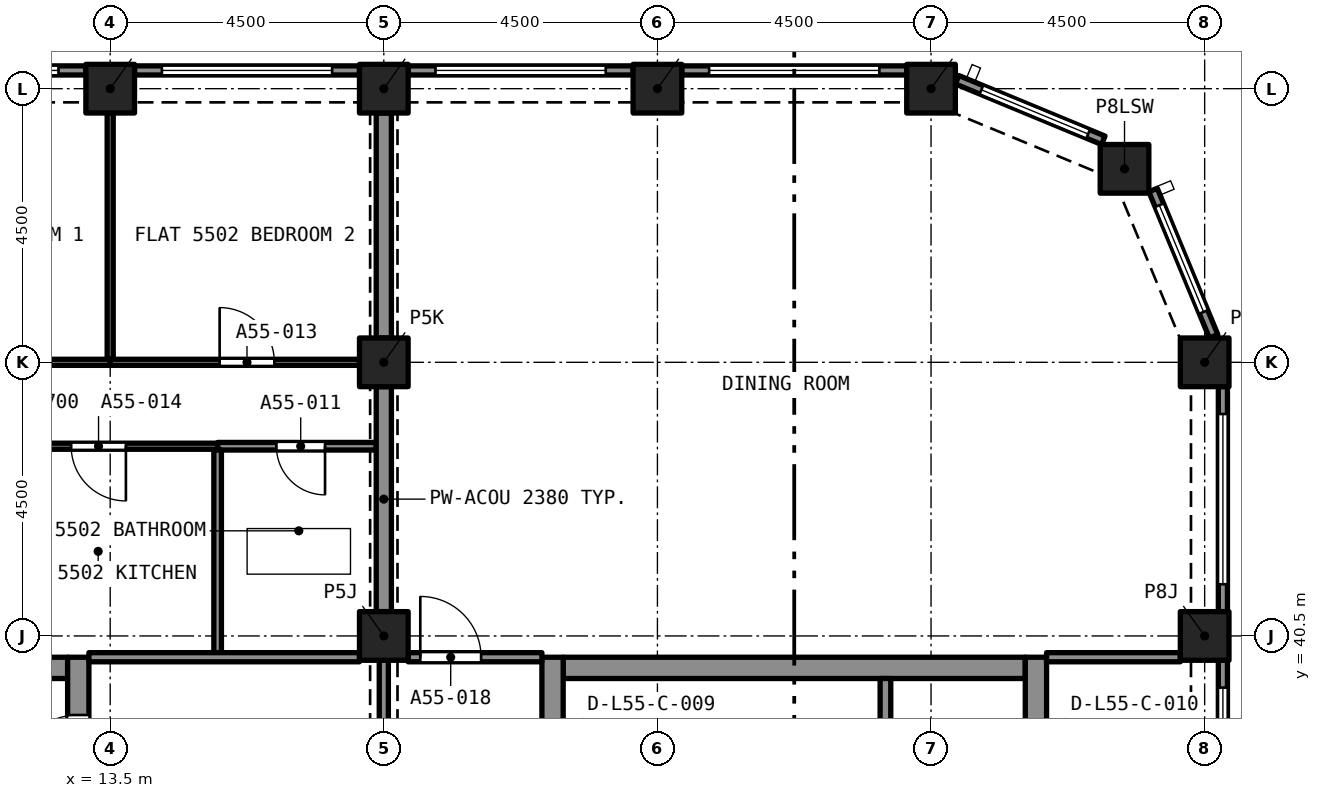
"""IFC4 building model, lengths in metres.
Left out: names, types, materials, properties, quantities, classifications, styles, units other than length and angle.
Written with IfcOpenShell. Run it as: python <this file> out.ifc"""

import sys

from ifc_helpers import new_model, si_unit, direction, frame, frame_2d, origin, origin_2d, place, context, subcontext, project, spatial, rectangle, extrude, element, fill, save


model = new_model("IFC4")
c1 = context("Model", 3, precision=1e-05, world=origin(), true_north=direction((0.0, 1.0)))
c2 = subcontext(c1, "Body", "Model", "MODEL_VIEW")
j1 = project(units=[si_unit("LENGTHUNIT", "METRE"), si_unit("PLANEANGLEUNIT", "RADIAN")], contexts=[c1])
p1 = place(None, origin())
s1 = spatial("IfcSite", under=j1, at=p1, CompositionType="ELEMENT")
p2 = place(p1, origin())
s2 = spatial("IfcBuilding", under=s1, at=p2, CompositionType="ELEMENT")
p3 = place(p2, frame((0.0, 0.0, 198.7)))
s3 = spatial("IfcBuildingStorey", under=s2, at=p3, CompositionType="ELEMENT", Elevation=198.7)
for number, where, z_axis, x_axis in (
    (1, (18.0, 40.5, 0.0), (0.0, 0.0, 1.0), (1.0, 0.0, 0.0)),
    (2, (31.5, 40.5, 0.0), (0.0, 0.0, 1.0), (1.0, 0.0, 0.0)),
    (3, (18.0, 45.0, 0.0), (0.0, 0.0, 1.0), (1.0, 0.0, 0.0)),
    (4, (31.5, 45.0, 0.0), (0.0, 0.0, 1.0), (1.0, 0.0, 0.0)),
    (5, (30.182, 48.182, 0.0), (0.0, 0.0, 1.0), (1.0, 0.0, 0.0)),
    (6, (13.5, 49.5, 0.0), (0.0, 0.0, 1.0), (1.0, 0.0, 0.0)),
    (7, (18.0, 49.5, 0.0), (0.0, 0.0, 1.0), (1.0, 0.0, 0.0)),
    (8, (22.5, 49.5, 0.0), (0.0, 0.0, 1.0), (1.0, 0.0, 0.0)),
    (9, (27.0, 49.5, 0.0), (0.0, 0.0, 1.0), (1.0, 0.0, 0.0)),
):
    element("IfcColumn", number, at=place(p3, frame(where, z_axis=z_axis, x_axis=x_axis)), inside=s3, PredefinedType="COLUMN", context=c2, shape_type="SweptSolid", body=[
        extrude(rectangle(XDim=0.8, YDim=0.8, at=origin_2d()), origin(), (0.0, 0.0, 1.0), 3.2),
    ])
p4 = place(p3, frame((5.2, 39.975, 0.0), z_axis=(0.0, 0.0, 1.0), x_axis=(1.0, 0.0, 0.0)))
e10 = element("IfcWall", 10, at=p4, inside=s3, PredefinedType="SOLIDWALL", context=c2, shape_type="SweptSolid", body=[
    extrude(rectangle(XDim=7.6, YDim=0.35, at=frame_2d((3.8, 0.0))), origin(), (0.0, 0.0, 1.0), 3.2),
])
p5 = place(p3, frame((12.975, 27.35, 0.0), z_axis=(0.0, 0.0, 1.0), x_axis=(0.0, 1.0, 0.0)))
e11 = element("IfcWall", 11, at=p5, inside=s3, PredefinedType="SOLIDWALL", context=c2, shape_type="SweptSolid", body=[
    extrude(rectangle(XDim=12.8, YDim=0.35, at=frame_2d((6.4, 0.0))), origin(), (0.0, 0.0, 1.0), 3.2),
])
p6 = place(p5, frame((10.75, 0.0, 0.0)))
e12 = element("IfcOpeningElement", 12, at=p6, cuts=e11, PredefinedType="OPENING", context=c2, shape_type="SweptSolid", body=[
    extrude(rectangle(XDim=1.1, YDim=2.1, at=frame_2d((0.55, 1.05))), frame((0.0, 0.185, 0.0), z_axis=(0.0, -1.0, 0.0), x_axis=(1.0, 0.0, 0.0)), (0.0, 0.0, 1.0), 0.37),
])
p7 = place(p5, frame((8.6, 0.0, 0.0)))
e13 = element("IfcOpeningElement", 13, at=p7, cuts=e11, PredefinedType="OPENING", context=c2, shape_type="SweptSolid", body=[
    extrude(rectangle(XDim=1.2, YDim=2.1, at=frame_2d((0.6, 1.05))), frame((0.0, 0.185, 0.0), z_axis=(0.0, -1.0, 0.0), x_axis=(1.0, 0.0, 0.0)), (0.0, 0.0, 1.0), 0.37),
])
p8 = place(p3, frame((20.95, 39.975, 0.0), z_axis=(0.0, 0.0, 1.0), x_axis=(1.0, 0.0, 0.0)))
e14 = element("IfcWall", 14, at=p8, inside=s3, PredefinedType="SOLIDWALL", context=c2, shape_type="SweptSolid", body=[
    extrude(rectangle(XDim=7.6, YDim=0.35, at=frame_2d((3.8, 0.0))), origin(), (0.0, 0.0, 1.0), 3.2),
])
p9 = place(p3, frame((20.775, 27.35, 0.0), z_axis=(0.0, 0.0, 1.0), x_axis=(0.0, 1.0, 0.0)))
e15 = element("IfcWall", 15, at=p9, inside=s3, PredefinedType="SOLIDWALL", context=c2, shape_type="SweptSolid", body=[
    extrude(rectangle(XDim=12.8, YDim=0.35, at=frame_2d((6.4, 0.0))), origin(), (0.0, 0.0, 1.0), 3.2),
])
p10 = place(p9, frame((8.6, 0.0, 0.0)))
e16 = element("IfcOpeningElement", 16, at=p10, cuts=e15, PredefinedType="OPENING", context=c2, shape_type="SweptSolid", body=[
    extrude(rectangle(XDim=1.2, YDim=2.1, at=frame_2d((0.6, 1.05))), frame((0.0, 0.185, 0.0), z_axis=(0.0, -1.0, 0.0), x_axis=(1.0, 0.0, 0.0)), (0.0, 0.0, 1.0), 0.37),
])
p11 = place(p3, frame((28.725, 27.35, 0.0), z_axis=(0.0, 0.0, 1.0), x_axis=(0.0, 1.0, 0.0)))
e17 = element("IfcWall", 17, at=p11, inside=s3, PredefinedType="SOLIDWALL", context=c2, shape_type="SweptSolid", body=[
    extrude(rectangle(XDim=12.8, YDim=0.35, at=frame_2d((6.4, 0.0))), origin(), (0.0, 0.0, 1.0), 3.2),
])
p12 = place(p11, frame((8.6, 0.0, 0.0)))
e18 = element("IfcOpeningElement", 18, at=p12, cuts=e17, PredefinedType="OPENING", context=c2, shape_type="SweptSolid", body=[
    extrude(rectangle(XDim=1.2, YDim=2.1, at=frame_2d((0.6, 1.05))), frame((0.0, 0.185, 0.0), z_axis=(0.0, -1.0, 0.0), x_axis=(1.0, 0.0, 0.0)), (0.0, 0.0, 1.0), 0.37),
])
p13 = place(p3, frame((31.8, 40.1, 0.0), z_axis=(0.0, 0.0, 1.0), x_axis=(0.0, -1.0, 0.0)))
e19 = element("IfcWall", 19, at=p13, inside=s3, PredefinedType="SOLIDWALL", context=c2, shape_type="SweptSolid", body=[
    extrude(rectangle(XDim=3.7, YDim=0.15, at=frame_2d((1.85, 0.0))), origin(), (0.0, 0.0, 1.0), 3.2),
])
p14 = place(p13, frame((0.45, 0.0, 0.45)))
e20 = element("IfcOpeningElement", 20, at=p14, cuts=e19, PredefinedType="OPENING", context=c2, shape_type="SweptSolid", body=[
    extrude(rectangle(XDim=2.8, YDim=1.95, at=frame_2d((1.4, 0.975))), frame((0.0, 0.085, 0.0), z_axis=(0.0, -1.0, 0.0), x_axis=(1.0, 0.0, 0.0)), (0.0, 0.0, 1.0), 0.17),
])
p15 = place(p3, frame((31.8, 44.6, 0.0), z_axis=(0.0, 0.0, 1.0), x_axis=(0.0, -1.0, 0.0)))
e21 = element("IfcWall", 21, at=p15, inside=s3, PredefinedType="SOLIDWALL", context=c2, shape_type="SweptSolid", body=[
    extrude(rectangle(XDim=3.7, YDim=0.15, at=frame_2d((1.85, 0.0))), origin(), (0.0, 0.0, 1.0), 3.2),
])
p16 = place(p15, frame((0.45, 0.0, 0.45)))
e22 = element("IfcOpeningElement", 22, at=p16, cuts=e21, PredefinedType="OPENING", context=c2, shape_type="SweptSolid", body=[
    extrude(rectangle(XDim=2.8, YDim=1.95, at=frame_2d((1.4, 0.975))), frame((0.0, 0.085, 0.0), z_axis=(0.0, -1.0, 0.0), x_axis=(1.0, 0.0, 0.0)), (0.0, 0.0, 1.0), 0.17),
])
p17 = place(p3, frame((30.651, 47.833, 0.0), z_axis=(0.0, 0.0, 1.0), x_axis=(0.382669406082, -0.923885342263, 0.0)))
e23 = element("IfcWall", 23, at=p17, inside=s3, PredefinedType="SOLIDWALL", context=c2, shape_type="SweptSolid", body=[
    extrude(rectangle(XDim=2.602, YDim=0.15, at=frame_2d((1.301, 0.0))), origin(), (0.0, 0.0, 1.0), 3.2),
])
p18 = place(p17, frame((0.27, 0.0, 0.45)))
e24 = element("IfcOpeningElement", 24, at=p18, cuts=e23, PredefinedType="OPENING", context=c2, shape_type="SweptSolid", body=[
    extrude(rectangle(XDim=1.9, YDim=1.95, at=frame_2d((0.95, 0.975))), frame((0.0, 0.085, 0.0), z_axis=(0.0, -1.0, 0.0), x_axis=(1.0, 0.0, 0.0)), (0.0, 0.0, 1.0), 0.17),
])
p19 = place(p3, frame((27.429, 49.647, 0.0), z_axis=(0.0, 0.0, 1.0), x_axis=(0.923885342263, -0.382669406082, 0.0)))
e25 = element("IfcWall", 25, at=p19, inside=s3, PredefinedType="SOLIDWALL", context=c2, shape_type="SweptSolid", body=[
    extrude(rectangle(XDim=2.602, YDim=0.15, at=frame_2d((1.301, 0.0))), origin(), (0.0, 0.0, 1.0), 3.2),
])
p20 = place(p19, frame((0.432, 0.0, 0.45)))
e26 = element("IfcOpeningElement", 26, at=p20, cuts=e25, PredefinedType="OPENING", context=c2, shape_type="SweptSolid", body=[
    extrude(rectangle(XDim=1.9, YDim=1.95, at=frame_2d((0.95, 0.975))), frame((0.0, 0.085, 0.0), z_axis=(0.0, -1.0, 0.0), x_axis=(1.0, 0.0, 0.0)), (0.0, 0.0, 1.0), 0.17),
])
p21 = place(p3, frame((22.9, 49.8, 0.0), z_axis=(0.0, 0.0, 1.0), x_axis=(1.0, 0.0, 0.0)))
e27 = element("IfcWall", 27, at=p21, inside=s3, PredefinedType="SOLIDWALL", context=c2, shape_type="SweptSolid", body=[
    extrude(rectangle(XDim=3.7, YDim=0.15, at=frame_2d((1.85, 0.0))), origin(), (0.0, 0.0, 1.0), 3.2),
])
p22 = place(p21, frame((0.45, 0.0, 0.45)))
e28 = element("IfcOpeningElement", 28, at=p22, cuts=e27, PredefinedType="OPENING", context=c2, shape_type="SweptSolid", body=[
    extrude(rectangle(XDim=2.8, YDim=1.95, at=frame_2d((1.4, 0.975))), frame((0.0, 0.085, 0.0), z_axis=(0.0, -1.0, 0.0), x_axis=(1.0, 0.0, 0.0)), (0.0, 0.0, 1.0), 0.17),
])
p23 = place(p3, frame((18.4, 49.8, 0.0), z_axis=(0.0, 0.0, 1.0), x_axis=(1.0, 0.0, 0.0)))
e29 = element("IfcWall", 29, at=p23, inside=s3, PredefinedType="SOLIDWALL", context=c2, shape_type="SweptSolid", body=[
    extrude(rectangle(XDim=3.7, YDim=0.15, at=frame_2d((1.85, 0.0))), origin(), (0.0, 0.0, 1.0), 3.2),
])
p24 = place(p23, frame((0.45, 0.0, 0.45)))
e30 = element("IfcOpeningElement", 30, at=p24, cuts=e29, PredefinedType="OPENING", context=c2, shape_type="SweptSolid", body=[
    extrude(rectangle(XDim=2.8, YDim=1.95, at=frame_2d((1.4, 0.975))), frame((0.0, 0.085, 0.0), z_axis=(0.0, -1.0, 0.0), x_axis=(1.0, 0.0, 0.0)), (0.0, 0.0, 1.0), 0.17),
])
p25 = place(p3, frame((13.9, 49.8, 0.0), z_axis=(0.0, 0.0, 1.0), x_axis=(1.0, 0.0, 0.0)))
e31 = element("IfcWall", 31, at=p25, inside=s3, PredefinedType="SOLIDWALL", context=c2, shape_type="SweptSolid", body=[
    extrude(rectangle(XDim=3.7, YDim=0.15, at=frame_2d((1.85, 0.0))), origin(), (0.0, 0.0, 1.0), 3.2),
])
p26 = place(p25, frame((0.45, 0.0, 0.45)))
e32 = element("IfcOpeningElement", 32, at=p26, cuts=e31, PredefinedType="OPENING", context=c2, shape_type="SweptSolid", body=[
    extrude(rectangle(XDim=2.8, YDim=1.95, at=frame_2d((1.4, 0.975))), frame((0.0, 0.085, 0.0), z_axis=(0.0, -1.0, 0.0), x_axis=(1.0, 0.0, 0.0)), (0.0, 0.0, 1.0), 0.17),
])
p27 = place(p3, frame((9.4, 49.8, 0.0), z_axis=(0.0, 0.0, 1.0), x_axis=(1.0, 0.0, 0.0)))
e33 = element("IfcWall", 33, at=p27, inside=s3, PredefinedType="SOLIDWALL", context=c2, shape_type="SweptSolid", body=[
    extrude(rectangle(XDim=3.7, YDim=0.15, at=frame_2d((1.85, 0.0))), origin(), (0.0, 0.0, 1.0), 3.2),
])
p28 = place(p27, frame((0.45, 0.0, 0.45)))
e34 = element("IfcOpeningElement", 34, at=p28, cuts=e33, PredefinedType="OPENING", context=c2, shape_type="SweptSolid", body=[
    extrude(rectangle(XDim=2.8, YDim=1.95, at=frame_2d((1.4, 0.975))), frame((0.0, 0.085, 0.0), z_axis=(0.0, -1.0, 0.0), x_axis=(1.0, 0.0, 0.0)), (0.0, 0.0, 1.0), 0.17),
])
p29 = place(p3, frame((17.875, 43.62, 0.0), z_axis=(0.0, 0.0, 1.0), x_axis=(-1.0, 0.0, 0.0)))
e35 = element("IfcWall", 35, at=p29, inside=s3, PredefinedType="PARTITIONING", context=c2, shape_type="SweptSolid", body=[
    extrude(rectangle(XDim=2.608, YDim=0.125, at=frame_2d((1.304, 0.0))), origin(), (0.0, 0.0, 1.0), 2.7),
])
p30 = place(p29, frame((0.842, 0.0, 0.0)))
e36 = element("IfcOpeningElement", 36, at=p30, cuts=e35, PredefinedType="OPENING", context=c2, shape_type="SweptSolid", body=[
    extrude(rectangle(XDim=0.8, YDim=2.1, at=frame_2d((0.4, 1.05))), frame((0.0, 0.073, 0.0), z_axis=(0.0, -1.0, 0.0), x_axis=(1.0, 0.0, 0.0)), (0.0, 0.0, 1.0), 0.145),
])
p31 = place(p3, frame((15.267, 40.225, 0.0), z_axis=(0.0, 0.0, 1.0), x_axis=(0.0, 1.0, 0.0)))
e37 = element("IfcWall", 37, at=p31, inside=s3, PredefinedType="PARTITIONING", context=c2, shape_type="SweptSolid", body=[
    extrude(rectangle(XDim=3.333, YDim=0.125, at=frame_2d((1.666, 0.0))), origin(), (0.0, 0.0, 1.0), 2.7),
])
p32 = place(p3, frame((18.0, 40.9, 0.0), z_axis=(0.0, 0.0, 1.0), x_axis=(0.0, 1.0, 0.0)))
e38 = element("IfcWall", 38, at=p32, inside=s3, PredefinedType="PARTITIONING", context=c2, shape_type="SweptSolid", body=[
    extrude(rectangle(XDim=3.7, YDim=0.25, at=frame_2d((1.85, 0.0))), origin(), (0.0, 0.0, 1.0), 2.38),
])
p33 = place(p3, frame((13.5, 45.05, 0.0), z_axis=(0.0, 0.0, 1.0), x_axis=(0.0, 1.0, 0.0)))
e39 = element("IfcWall", 39, at=p33, inside=s3, PredefinedType="PARTITIONING", context=c2, shape_type="SweptSolid", body=[
    extrude(rectangle(XDim=4.05, YDim=0.1, at=frame_2d((2.025, 0.0))), origin(), (0.0, 0.0, 1.0), 2.7),
])
p34 = place(p3, frame((9.0, 45.0, 0.0), z_axis=(0.0, 0.0, 1.0), x_axis=(1.0, 0.0, 0.0)))
e40 = element("IfcWall", 40, at=p34, inside=s3, PredefinedType="PARTITIONING", context=c2, shape_type="SweptSolid", body=[
    extrude(rectangle(XDim=4.5, YDim=0.1, at=frame_2d((2.25, 0.0))), origin(), (0.0, 0.0, 1.0), 2.7),
])
p35 = place(p34, frame((1.8, 0.0, 0.0)))
e41 = element("IfcOpeningElement", 41, at=p35, cuts=e40, PredefinedType="OPENING", context=c2, shape_type="SweptSolid", body=[
    extrude(rectangle(XDim=0.9, YDim=2.1, at=frame_2d((0.45, 1.05))), frame((0.0, 0.06, 0.0), z_axis=(0.0, -1.0, 0.0), x_axis=(1.0, 0.0, 0.0)), (0.0, 0.0, 1.0), 0.12),
])
p36 = place(p3, frame((13.5, 45.0, 0.0), z_axis=(0.0, 0.0, 1.0), x_axis=(1.0, 0.0, 0.0)))
e42 = element("IfcWall", 42, at=p36, inside=s3, PredefinedType="PARTITIONING", context=c2, shape_type="SweptSolid", body=[
    extrude(rectangle(XDim=4.1, YDim=0.1, at=frame_2d((2.05, 0.0))), origin(), (0.0, 0.0, 1.0), 2.7),
])
p37 = place(p36, frame((1.8, 0.0, 0.0)))
e43 = element("IfcOpeningElement", 43, at=p37, cuts=e42, PredefinedType="OPENING", context=c2, shape_type="SweptSolid", body=[
    extrude(rectangle(XDim=0.9, YDim=2.1, at=frame_2d((0.45, 1.05))), frame((0.0, 0.06, 0.0), z_axis=(0.0, -1.0, 0.0), x_axis=(1.0, 0.0, 0.0)), (0.0, 0.0, 1.0), 0.12),
])
p38 = place(p3, frame((18.0, 45.4, 0.0), z_axis=(0.0, 0.0, 1.0), x_axis=(0.0, 1.0, 0.0)))
e44 = element("IfcWall", 44, at=p38, inside=s3, PredefinedType="PARTITIONING", context=c2, shape_type="SweptSolid", body=[
    extrude(rectangle(XDim=3.7, YDim=0.25, at=frame_2d((1.85, 0.0))), origin(), (0.0, 0.0, 1.0), 2.38),
])
p39 = place(p3, frame((15.267, 43.62, 0.0), z_axis=(0.0, 0.0, 1.0), x_axis=(-1.0, 0.0, 0.0)))
e45 = element("IfcWall", 45, at=p39, inside=s3, PredefinedType="PARTITIONING", context=c2, shape_type="SweptSolid", body=[
    extrude(rectangle(XDim=3.967, YDim=0.1, at=frame_2d((1.983, 0.0))), origin(), (0.0, 0.0, 1.0), 2.7),
])
p40 = place(p39, frame((1.508, 0.0, 0.0)))
e46 = element("IfcOpeningElement", 46, at=p40, cuts=e45, PredefinedType="OPENING", context=c2, shape_type="SweptSolid", body=[
    extrude(rectangle(XDim=0.9, YDim=2.1, at=frame_2d((0.45, 1.05))), frame((0.0, 0.06, 0.0), z_axis=(0.0, -1.0, 0.0), x_axis=(1.0, 0.0, 0.0)), (0.0, 0.0, 1.0), 0.12),
])
p41 = place(p3, frame((13.15, 40.15, 0.0), z_axis=(0.0, 0.0, 1.0), x_axis=(1.0, 0.0, 0.0)))
e47 = element("IfcWall", 47, at=p41, inside=s3, PredefinedType="PARTITIONING", context=c2, shape_type="SweptSolid", body=[
    extrude(rectangle(XDim=4.45, YDim=0.15, at=frame_2d((2.225, 0.0))), origin(), (0.0, 0.0, 1.0), 2.7),
])
p42 = place(p3, frame((18.4, 40.15, 0.0), z_axis=(0.0, 0.0, 1.0), x_axis=(1.0, 0.0, 0.0)))
e48 = element("IfcWall", 48, at=p42, inside=s3, PredefinedType="PARTITIONING", context=c2, shape_type="SweptSolid", body=[
    extrude(rectangle(XDim=2.2, YDim=0.15, at=frame_2d((1.1, 0.0))), origin(), (0.0, 0.0, 1.0), 2.7),
])
p43 = place(p42, frame((0.2, 0.0, 0.0)))
e49 = element("IfcOpeningElement", 49, at=p43, cuts=e48, PredefinedType="OPENING", context=c2, shape_type="SweptSolid", body=[
    extrude(rectangle(XDim=1.0, YDim=2.1, at=frame_2d((0.5, 1.05))), frame((0.0, 0.085, 0.0), z_axis=(0.0, -1.0, 0.0), x_axis=(1.0, 0.0, 0.0)), (0.0, 0.0, 1.0), 0.17),
])
p44 = place(p3, frame((28.9, 40.15, 0.0), z_axis=(0.0, 0.0, 1.0), x_axis=(1.0, 0.0, 0.0)))
e50 = element("IfcWall", 50, at=p44, inside=s3, PredefinedType="PARTITIONING", context=c2, shape_type="SweptSolid", body=[
    extrude(rectangle(XDim=2.2, YDim=0.15, at=frame_2d((1.1, 0.0))), origin(), (0.0, 0.0, 1.0), 2.7),
])
p45 = place(p3, frame((18.0, 40.1, 0.0), z_axis=(0.0, 0.0, 1.0), x_axis=(0.0, -1.0, 0.0)))
e51 = element("IfcWall", 51, at=p45, inside=s3, PredefinedType="PARTITIONING", context=c2, shape_type="SweptSolid", body=[
    extrude(rectangle(XDim=3.7, YDim=0.15, at=frame_2d((1.85, 0.0))), origin(), (0.0, 0.0, 1.0), 2.38),
])
p46 = place(p45, frame((1.25, 0.0, 0.0)))
e52 = element("IfcOpeningElement", 52, at=p46, cuts=e51, PredefinedType="OPENING", context=c2, shape_type="SweptSolid", body=[
    extrude(rectangle(XDim=1.2, YDim=2.1, at=frame_2d((0.6, 1.05))), frame((0.0, 0.085, 0.0), z_axis=(0.0, -1.0, 0.0), x_axis=(1.0, 0.0, 0.0)), (0.0, 0.0, 1.0), 0.17),
])
p47 = place(p3, frame((26.25, 37.5, 0.0), z_axis=(0.0, 0.0, 1.0), x_axis=(0.0, 1.0, 0.0)))
e53 = element("IfcWall", 53, at=p47, inside=s3, PredefinedType="SOLIDWALL", context=c2, shape_type="SweptSolid", body=[
    extrude(rectangle(XDim=2.3, YDim=0.175, at=frame_2d((1.15, 0.0))), origin(), (0.0, 0.0, 1.0), 2.7),
])
p48 = place(p14, origin())
e54 = element("IfcWindow", 54, at=p48, inside=s3, PartitioningType="SINGLE_PANEL", PredefinedType="WINDOW", context=c2, shape_type="SweptSolid", body=[
    extrude(rectangle(XDim=2.8, YDim=1.95, at=frame_2d((1.4, 0.975))), frame((0.0, 0.03, 0.0), z_axis=(0.0, -1.0, 0.0), x_axis=(1.0, 0.0, 0.0)), (0.0, 0.0, 1.0), 0.06),
])
fill(e20, e54)
p49 = place(p16, origin())
e55 = element("IfcWindow", 55, at=p49, inside=s3, PartitioningType="SINGLE_PANEL", PredefinedType="WINDOW", context=c2, shape_type="SweptSolid", body=[
    extrude(rectangle(XDim=2.8, YDim=1.95, at=frame_2d((1.4, 0.975))), frame((0.0, 0.03, 0.0), z_axis=(0.0, -1.0, 0.0), x_axis=(1.0, 0.0, 0.0)), (0.0, 0.0, 1.0), 0.06),
])
fill(e22, e55)
p50 = place(p18, origin())
e56 = element("IfcWindow", 56, at=p50, inside=s3, PartitioningType="SINGLE_PANEL", PredefinedType="WINDOW", context=c2, shape_type="SweptSolid", body=[
    extrude(rectangle(XDim=1.9, YDim=1.95, at=frame_2d((0.95, 0.975))), frame((0.0, 0.03, 0.0), z_axis=(0.0, -1.0, 0.0), x_axis=(1.0, 0.0, 0.0)), (0.0, 0.0, 1.0), 0.06),
])
fill(e24, e56)
p51 = place(p20, origin())
e57 = element("IfcWindow", 57, at=p51, inside=s3, PartitioningType="SINGLE_PANEL", PredefinedType="WINDOW", context=c2, shape_type="SweptSolid", body=[
    extrude(rectangle(XDim=1.9, YDim=1.95, at=frame_2d((0.95, 0.975))), frame((0.0, 0.03, 0.0), z_axis=(0.0, -1.0, 0.0), x_axis=(1.0, 0.0, 0.0)), (0.0, 0.0, 1.0), 0.06),
])
fill(e26, e57)
p52 = place(p22, origin())
e58 = element("IfcWindow", 58, at=p52, inside=s3, PartitioningType="SINGLE_PANEL", PredefinedType="WINDOW", context=c2, shape_type="SweptSolid", body=[
    extrude(rectangle(XDim=2.8, YDim=1.95, at=frame_2d((1.4, 0.975))), frame((0.0, 0.03, 0.0), z_axis=(0.0, -1.0, 0.0), x_axis=(1.0, 0.0, 0.0)), (0.0, 0.0, 1.0), 0.06),
])
fill(e28, e58)
p53 = place(p24, origin())
e59 = element("IfcWindow", 59, at=p53, inside=s3, PartitioningType="SINGLE_PANEL", PredefinedType="WINDOW", context=c2, shape_type="SweptSolid", body=[
    extrude(rectangle(XDim=2.8, YDim=1.95, at=frame_2d((1.4, 0.975))), frame((0.0, 0.03, 0.0), z_axis=(0.0, -1.0, 0.0), x_axis=(1.0, 0.0, 0.0)), (0.0, 0.0, 1.0), 0.06),
])
fill(e30, e59)
p54 = place(p26, origin())
e60 = element("IfcWindow", 60, at=p54, inside=s3, PartitioningType="SINGLE_PANEL", PredefinedType="WINDOW", context=c2, shape_type="SweptSolid", body=[
    extrude(rectangle(XDim=2.8, YDim=1.95, at=frame_2d((1.4, 0.975))), frame((0.0, 0.03, 0.0), z_axis=(0.0, -1.0, 0.0), x_axis=(1.0, 0.0, 0.0)), (0.0, 0.0, 1.0), 0.06),
])
fill(e32, e60)
p55 = place(p28, origin())
e61 = element("IfcWindow", 61, at=p55, inside=s3, PartitioningType="SINGLE_PANEL", PredefinedType="WINDOW", context=c2, shape_type="SweptSolid", body=[
    extrude(rectangle(XDim=2.8, YDim=1.95, at=frame_2d((1.4, 0.975))), frame((0.0, 0.03, 0.0), z_axis=(0.0, -1.0, 0.0), x_axis=(1.0, 0.0, 0.0)), (0.0, 0.0, 1.0), 0.06),
])
fill(e34, e61)
p56 = place(p30, origin())
e62 = element("IfcDoor", 62, at=p56, inside=s3, OperationType="SINGLE_SWING_LEFT", PredefinedType="DOOR", context=c2, shape_type="SweptSolid", body=[
    extrude(rectangle(XDim=0.8, YDim=2.1, at=frame_2d((0.4, 1.05))), frame((0.0, 0.025, 0.0), z_axis=(0.0, -1.0, 0.0), x_axis=(1.0, 0.0, 0.0)), (0.0, 0.0, 1.0), 0.05),
])
fill(e36, e62)
p57 = place(p37, origin())
e63 = element("IfcDoor", 63, at=p57, inside=s3, OperationType="SINGLE_SWING_RIGHT", PredefinedType="DOOR", context=c2, shape_type="SweptSolid", body=[
    extrude(rectangle(XDim=0.9, YDim=2.1, at=frame_2d((0.45, 1.05))), frame((0.0, 0.025, 0.0), z_axis=(0.0, -1.0, 0.0), x_axis=(1.0, 0.0, 0.0)), (0.0, 0.0, 1.0), 0.05),
])
fill(e43, e63)
p58 = place(p40, origin())
e64 = element("IfcDoor", 64, at=p58, inside=s3, OperationType="SINGLE_SWING_LEFT", PredefinedType="DOOR", context=c2, shape_type="SweptSolid", body=[
    extrude(rectangle(XDim=0.9, YDim=2.1, at=frame_2d((0.45, 1.05))), frame((0.0, 0.025, 0.0), z_axis=(0.0, -1.0, 0.0), x_axis=(1.0, 0.0, 0.0)), (0.0, 0.0, 1.0), 0.05),
])
fill(e46, e64)
p59 = place(p43, origin())
e65 = element("IfcDoor", 65, at=p59, inside=s3, OperationType="SINGLE_SWING_LEFT", PredefinedType="DOOR", context=c2, shape_type="SweptSolid", body=[
    extrude(rectangle(XDim=1.0, YDim=2.1, at=frame_2d((0.5, 1.05))), frame((0.0, 0.025, 0.0), z_axis=(0.0, -1.0, 0.0), x_axis=(1.0, 0.0, 0.0)), (0.0, 0.0, 1.0), 0.05),
])
fill(e49, e65)
p60 = place(p6, origin())
e66 = element("IfcDoor", 66, at=p60, inside=s3, OperationType="SINGLE_SWING_LEFT", PredefinedType="DOOR", context=c2, shape_type="SweptSolid", body=[
    extrude(rectangle(XDim=1.1, YDim=2.1, at=frame_2d((0.55, 1.05))), frame((0.0, 0.025, 0.0), z_axis=(0.0, -1.0, 0.0), x_axis=(1.0, 0.0, 0.0)), (0.0, 0.0, 1.0), 0.05),
])
fill(e12, e66)
save(model, sys.argv[1])
